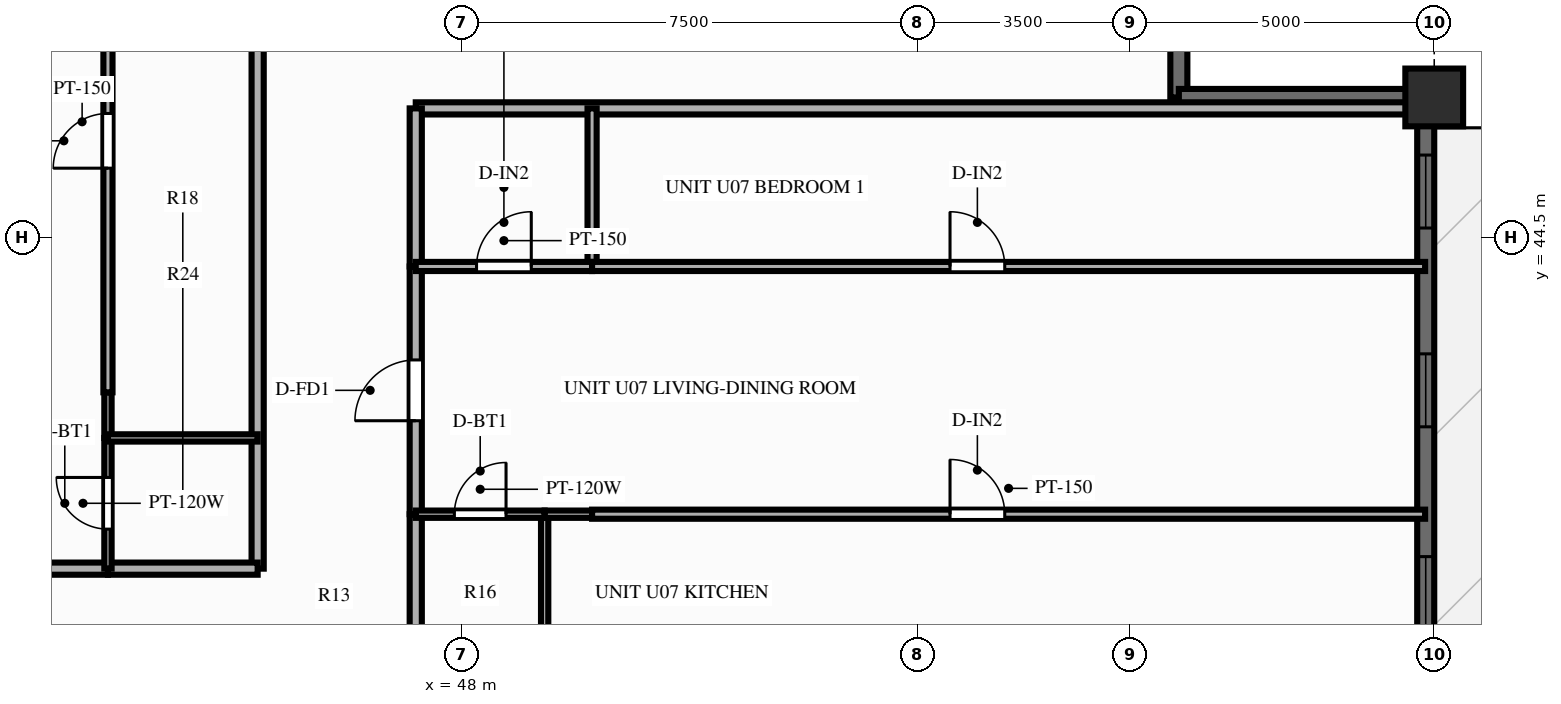
"""IFC4 building model, lengths in metres.
Left out: names, types, materials, properties, quantities, classifications, styles, units other than length and angle.
Written with IfcOpenShell. Run it as: python <this file> out.ifc"""

import sys

from ifc_helpers import new_model, si_unit, direction, frame, frame_2d, origin, origin_2d, place, context, subcontext, project, spatial, rectangle, extrude, source, transform, mapped, element, fill, save


model = new_model("IFC4")
c1 = context("Model", 3, precision=1e-05, world=origin(), true_north=direction((0.0, 1.0)))
c2 = subcontext(c1, "Body", "Model", "MODEL_VIEW")
j1 = project(units=[si_unit("LENGTHUNIT", "METRE"), si_unit("PLANEANGLEUNIT", "RADIAN")], contexts=[c1])
p1 = place(None, origin())
s1 = spatial("IfcSite", under=j1, at=p1, CompositionType="ELEMENT")
p2 = place(p1, origin())
s2 = spatial("IfcBuilding", under=s1, at=p2, CompositionType="ELEMENT")
p3 = place(p2, frame((0.0, 0.0, 95.85)))
s3 = spatial("IfcBuildingStorey", under=s2, at=p3, CompositionType="ELEMENT", Elevation=95.85)
m1 = source(origin(), c2, "Body", "SweptSolid", [
    extrude(rectangle(XDim=0.95, YDim=0.95, at=origin_2d()), origin(), (0.0, 0.0, 1.0), 3.0),
])
p4 = place(p3, frame((64.0, 46.8, 0.0), z_axis=(0.0, 0.0, 1.0), x_axis=(1.0, 0.0, 0.0)))
e1 = element("IfcColumn", 1, at=p4, inside=s3, PredefinedType="COLUMN", context=c2, shape_type="MappedRepresentation", body=[
    mapped(m1, transform((0.0, 0.0, 0.0), scale=1.0)),
])
p5 = place(p3, frame((63.86, 7.2, 0.0), z_axis=(0.0, 0.0, 1.0), x_axis=(0.0, 1.0, 0.0)))
e2 = element("IfcWall", 2, at=p5, inside=s3, PredefinedType="SOLIDWALL", context=c2, shape_type="SweptSolid", body=[
    extrude(rectangle(XDim=39.6, YDim=0.28, at=frame_2d((19.8, 0.0))), origin(), (0.0, 0.0, 1.0), 2.28),
])
p6 = place(p5, frame((0.945, 0.0, 0.25)))
e3 = element("IfcOpeningElement", 3, at=p6, cuts=e2, PredefinedType="OPENING", context=c2, shape_type="SweptSolid", body=[
    extrude(rectangle(XDim=1.2, YDim=1.5, at=frame_2d((0.6, 0.75))), frame((0.0, 0.152, 0.0), z_axis=(0.0, -1.0, 0.0), x_axis=(1.0, 0.0, 0.0)), (0.0, 0.0, 1.0), 0.304),
])
p7 = place(p5, frame((4.213, 0.0, 0.25)))
e4 = element("IfcOpeningElement", 4, at=p7, cuts=e2, PredefinedType="OPENING", context=c2, shape_type="SweptSolid", body=[
    extrude(rectangle(XDim=1.2, YDim=1.5, at=frame_2d((0.6, 0.75))), frame((0.0, 0.152, 0.0), z_axis=(0.0, -1.0, 0.0), x_axis=(1.0, 0.0, 0.0)), (0.0, 0.0, 1.0), 0.304),
])
p8 = place(p5, frame((7.55, 0.0, 0.25)))
e5 = element("IfcOpeningElement", 5, at=p8, cuts=e2, PredefinedType="OPENING", context=c2, shape_type="SweptSolid", body=[
    extrude(rectangle(XDim=1.2, YDim=1.5, at=frame_2d((0.6, 0.75))), frame((0.0, 0.152, 0.0), z_axis=(0.0, -1.0, 0.0), x_axis=(1.0, 0.0, 0.0)), (0.0, 0.0, 1.0), 0.304),
])
p9 = place(p5, frame((13.483, 0.0, 0.25)))
e6 = element("IfcOpeningElement", 6, at=p9, cuts=e2, PredefinedType="OPENING", context=c2, shape_type="SweptSolid", body=[
    extrude(rectangle(XDim=1.2, YDim=1.5, at=frame_2d((0.6, 0.75))), frame((0.0, 0.152, 0.0), z_axis=(0.0, -1.0, 0.0), x_axis=(1.0, 0.0, 0.0)), (0.0, 0.0, 1.0), 0.304),
])
p10 = place(p5, frame((16.82, 0.0, 0.25)))
e7 = element("IfcOpeningElement", 7, at=p10, cuts=e2, PredefinedType="OPENING", context=c2, shape_type="SweptSolid", body=[
    extrude(rectangle(XDim=1.2, YDim=1.5, at=frame_2d((0.6, 0.75))), frame((0.0, 0.152, 0.0), z_axis=(0.0, -1.0, 0.0), x_axis=(1.0, 0.0, 0.0)), (0.0, 0.0, 1.0), 0.304),
])
p11 = place(p5, frame((19.2, 0.0, 0.25)))
e8 = element("IfcOpeningElement", 8, at=p11, cuts=e2, PredefinedType="OPENING", context=c2, shape_type="SweptSolid", body=[
    extrude(rectangle(XDim=1.2, YDim=1.5, at=frame_2d((0.6, 0.75))), frame((0.0, 0.152, 0.0), z_axis=(0.0, -1.0, 0.0), x_axis=(1.0, 0.0, 0.0)), (0.0, 0.0, 1.0), 0.304),
])
p12 = place(p5, frame((21.578, 0.0, 0.25)))
e9 = element("IfcOpeningElement", 9, at=p12, cuts=e2, PredefinedType="OPENING", context=c2, shape_type="SweptSolid", body=[
    extrude(rectangle(XDim=1.2, YDim=1.5, at=frame_2d((0.6, 0.75))), frame((0.0, 0.152, 0.0), z_axis=(0.0, -1.0, 0.0), x_axis=(1.0, 0.0, 0.0)), (0.0, 0.0, 1.0), 0.304),
])
p13 = place(p5, frame((26.313, 0.0, 0.0), z_axis=(0.0, 0.0, 1.0), x_axis=(-1.0, 0.0, 0.0)))
e10 = element("IfcOpeningElement", 10, at=p13, cuts=e2, PredefinedType="OPENING", context=c2, shape_type="SweptSolid", body=[
    extrude(rectangle(XDim=1.6, YDim=2.15, at=frame_2d((0.8, 1.075))), frame((0.0, 0.152, 0.0), z_axis=(0.0, -1.0, 0.0), x_axis=(1.0, 0.0, 0.0)), (0.0, 0.0, 1.0), 0.304),
])
p14 = place(p5, frame((29.305, 0.0, 0.25)))
e11 = element("IfcOpeningElement", 11, at=p14, cuts=e2, PredefinedType="OPENING", context=c2, shape_type="SweptSolid", body=[
    extrude(rectangle(XDim=0.7, YDim=1.5, at=frame_2d((0.35, 0.75))), frame((0.0, 0.152, 0.0), z_axis=(0.0, -1.0, 0.0), x_axis=(1.0, 0.0, 0.0)), (0.0, 0.0, 1.0), 0.304),
])
p15 = place(p5, frame((30.848, 0.0, 0.25)))
e12 = element("IfcOpeningElement", 12, at=p15, cuts=e2, PredefinedType="OPENING", context=c2, shape_type="SweptSolid", body=[
    extrude(rectangle(XDim=1.2, YDim=1.5, at=frame_2d((0.6, 0.75))), frame((0.0, 0.152, 0.0), z_axis=(0.0, -1.0, 0.0), x_axis=(1.0, 0.0, 0.0)), (0.0, 0.0, 1.0), 0.304),
])
p16 = place(p5, frame((34.183, 0.0, 0.25)))
e13 = element("IfcOpeningElement", 13, at=p16, cuts=e2, PredefinedType="OPENING", context=c2, shape_type="SweptSolid", body=[
    extrude(rectangle(XDim=1.2, YDim=1.5, at=frame_2d((0.6, 0.75))), frame((0.0, 0.152, 0.0), z_axis=(0.0, -1.0, 0.0), x_axis=(1.0, 0.0, 0.0)), (0.0, 0.0, 1.0), 0.304),
])
p17 = place(p5, frame((37.452, 0.0, 0.25)))
e14 = element("IfcOpeningElement", 14, at=p17, cuts=e2, PredefinedType="OPENING", context=c2, shape_type="SweptSolid", body=[
    extrude(rectangle(XDim=1.2, YDim=1.5, at=frame_2d((0.6, 0.75))), frame((0.0, 0.152, 0.0), z_axis=(0.0, -1.0, 0.0), x_axis=(1.0, 0.0, 0.0)), (0.0, 0.0, 1.0), 0.304),
])
for number, where, z_axis, x_axis in (
    (15, (59.8, 46.8, 0.0), (0.0, 0.0, 1.0), (0.0, 1.0, 0.0)),
    (16, (59.8, 46.8, 0.0), (0.0, 0.0, 1.0), (1.0, 0.0, 0.0)),
):
    element("IfcWall", number, at=place(p3, frame(where, z_axis=z_axis, x_axis=x_axis)), inside=s3, PredefinedType="SOLIDWALL", context=c2, shape_type="SweptSolid", body=[
        extrude(rectangle(XDim=4.12, YDim=0.28, at=frame_2d((2.06, 0.0))), origin(), (0.0, 0.0, 1.0), 2.28),
    ])
p18 = place(p3, frame((44.65, 39.05, 0.0), z_axis=(0.0, 0.0, 1.0), x_axis=(0.0, 1.0, 0.0)))
e17 = element("IfcWall", 17, at=p18, inside=s3, PredefinedType="PARTITIONING", context=c2, shape_type="SweptSolid", body=[
    extrude(rectangle(XDim=11.8, YDim=0.2, at=frame_2d((5.9, 0.0))), origin(), (0.0, 0.0, 1.0), 2.34),
])
p19 = place(p3, frame((39.298, 39.05, 0.0), z_axis=(0.0, 0.0, 1.0), x_axis=(1.0, 0.0, 0.0)))
e18 = element("IfcWall", 18, at=p19, inside=s3, PredefinedType="PARTITIONING", context=c2, shape_type="SweptSolid", body=[
    extrude(rectangle(XDim=2.89, YDim=0.2, at=frame_2d((1.445, 0.0))), origin(), (0.0, 0.0, 1.0), 2.79),
])
p20 = place(p19, frame((0.945, 0.0, 0.0)))
e19 = element("IfcOpeningElement", 19, at=p20, cuts=e18, PredefinedType="OPENING", context=c2, shape_type="SweptSolid", body=[
    extrude(rectangle(XDim=1.0, YDim=2.15, at=frame_2d((0.5, 1.075))), frame((0.0, 0.112, 0.0), z_axis=(0.0, -1.0, 0.0), x_axis=(1.0, 0.0, 0.0)), (0.0, 0.0, 1.0), 0.224),
])
p21 = place(p3, frame((42.188, 39.05, 0.0), z_axis=(0.0, 0.0, 1.0), x_axis=(1.0, 0.0, 0.0)))
e20 = element("IfcWall", 20, at=p21, inside=s3, PredefinedType="PARTITIONING", context=c2, shape_type="SweptSolid", body=[
    extrude(rectangle(XDim=2.462, YDim=0.2, at=frame_2d((1.231, 0.0))), origin(), (0.0, 0.0, 1.0), 2.79),
])
p22 = place(p3, frame((42.188, 39.05, 0.0), z_axis=(0.0, 0.0, 1.0), x_axis=(0.0, 1.0, 0.0)))
e21 = element("IfcWall", 21, at=p22, inside=s3, PredefinedType="PARTITIONING", context=c2, shape_type="SweptSolid", body=[
    extrude(rectangle(XDim=2.15, YDim=0.12, at=frame_2d((1.075, 0.0))), origin(), (0.0, 0.0, 1.0), 2.79),
])
p23 = place(p22, frame((0.65, 0.0, 0.0)))
e22 = element("IfcOpeningElement", 22, at=p23, cuts=e21, PredefinedType="OPENING", context=c2, shape_type="SweptSolid", body=[
    extrude(rectangle(XDim=0.85, YDim=2.05, at=frame_2d((0.425, 1.025))), frame((0.0, 0.072, 0.0), z_axis=(0.0, -1.0, 0.0), x_axis=(1.0, 0.0, 0.0)), (0.0, 0.0, 1.0), 0.144),
])
p24 = place(p3, frame((42.188, 41.2, 0.0), z_axis=(0.0, 0.0, 1.0), x_axis=(0.0, 1.0, 0.0)))
e23 = element("IfcWall", 23, at=p24, inside=s3, PredefinedType="PARTITIONING", context=c2, shape_type="SweptSolid", body=[
    extrude(rectangle(XDim=0.75, YDim=0.12, at=frame_2d((0.375, 0.0))), origin(), (0.0, 0.0, 1.0), 2.79),
])
p25 = place(p3, frame((42.188, 41.2, 0.0), z_axis=(0.0, 0.0, 1.0), x_axis=(1.0, 0.0, 0.0)))
e24 = element("IfcWall", 24, at=p25, inside=s3, PredefinedType="PARTITIONING", context=c2, shape_type="SweptSolid", body=[
    extrude(rectangle(XDim=2.462, YDim=0.12, at=frame_2d((1.231, 0.0))), origin(), (0.0, 0.0, 1.0), 2.79),
])
p26 = place(p3, frame((42.188, 41.95, 0.0), z_axis=(0.0, 0.0, 1.0), x_axis=(0.0, 1.0, 0.0)))
e25 = element("IfcWall", 25, at=p26, inside=s3, PredefinedType="PARTITIONING", context=c2, shape_type="SweptSolid", body=[
    extrude(rectangle(XDim=8.9, YDim=0.15, at=frame_2d((4.45, 0.0))), origin(), (0.0, 0.0, 1.0), 2.79),
])
p27 = place(p26, frame((3.687, 0.0, 0.0)))
e26 = element("IfcOpeningElement", 26, at=p27, cuts=e25, PredefinedType="OPENING", context=c2, shape_type="SweptSolid", body=[
    extrude(rectangle(XDim=0.9, YDim=2.1, at=frame_2d((0.45, 1.05))), frame((0.0, 0.087, 0.0), z_axis=(0.0, -1.0, 0.0), x_axis=(1.0, 0.0, 0.0)), (0.0, 0.0, 1.0), 0.174),
])
p28 = place(p3, frame((47.25, 46.62, 0.0), z_axis=(0.0, 0.0, 1.0), x_axis=(1.0, 0.0, 0.0)))
e27 = element("IfcWall", 27, at=p28, inside=s3, PredefinedType="PARTITIONING", context=c2, shape_type="SweptSolid", body=[
    extrude(rectangle(XDim=16.6, YDim=0.2, at=frame_2d((8.3, 0.0))), origin(), (0.0, 0.0, 1.0), 2.79),
])
p29 = place(p3, frame((47.25, 37.35, 0.0), z_axis=(0.0, 0.0, 1.0), x_axis=(0.0, 1.0, 0.0)))
e28 = element("IfcWall", 28, at=p29, inside=s3, PredefinedType="PARTITIONING", context=c2, shape_type="SweptSolid", body=[
    extrude(rectangle(XDim=2.595, YDim=0.2, at=frame_2d((1.298, 0.0))), origin(), (0.0, 0.0, 1.0), 2.79),
])
p30 = place(p3, frame((47.25, 39.946, 0.0), z_axis=(0.0, 0.0, 1.0), x_axis=(0.0, 1.0, 0.0)))
e29 = element("IfcWall", 29, at=p30, inside=s3, PredefinedType="PARTITIONING", context=c2, shape_type="SweptSolid", body=[
    extrude(rectangle(XDim=4.074, YDim=0.2, at=frame_2d((2.037, 0.0))), origin(), (0.0, 0.0, 1.0), 2.79),
])
p31 = place(p30, frame((1.537, 0.0, 0.0)))
e30 = element("IfcOpeningElement", 30, at=p31, cuts=e29, PredefinedType="OPENING", context=c2, shape_type="SweptSolid", body=[
    extrude(rectangle(XDim=1.0, YDim=2.15, at=frame_2d((0.5, 1.075))), frame((0.0, 0.112, 0.0), z_axis=(0.0, -1.0, 0.0), x_axis=(1.0, 0.0, 0.0)), (0.0, 0.0, 1.0), 0.224),
])
p32 = place(p3, frame((47.25, 44.02, 0.0), z_axis=(0.0, 0.0, 1.0), x_axis=(0.0, 1.0, 0.0)))
e31 = element("IfcWall", 31, at=p32, inside=s3, PredefinedType="PARTITIONING", context=c2, shape_type="SweptSolid", body=[
    extrude(rectangle(XDim=2.6, YDim=0.2, at=frame_2d((1.3, 0.0))), origin(), (0.0, 0.0, 1.0), 2.79),
])
p33 = place(p3, frame((49.37, 37.35, 0.0), z_axis=(0.0, 0.0, 1.0), x_axis=(0.0, 1.0, 0.0)))
e32 = element("IfcWall", 32, at=p33, inside=s3, PredefinedType="PARTITIONING", context=c2, shape_type="SweptSolid", body=[
    extrude(rectangle(XDim=2.595, YDim=0.12, at=frame_2d((1.298, 0.0))), origin(), (0.0, 0.0, 1.0), 2.79),
])
p34 = place(p3, frame((50.15, 44.02, 0.0), z_axis=(0.0, 0.0, 1.0), x_axis=(0.0, 1.0, 0.0)))
e33 = element("IfcWall", 33, at=p34, inside=s3, PredefinedType="PARTITIONING", context=c2, shape_type="SweptSolid", body=[
    extrude(rectangle(XDim=2.6, YDim=0.15, at=frame_2d((1.3, 0.0))), origin(), (0.0, 0.0, 1.0), 2.79),
])
p35 = place(p3, frame((47.25, 39.946, 0.0), z_axis=(0.0, 0.0, 1.0), x_axis=(1.0, 0.0, 0.0)))
e34 = element("IfcWall", 34, at=p35, inside=s3, PredefinedType="PARTITIONING", context=c2, shape_type="SweptSolid", body=[
    extrude(rectangle(XDim=2.12, YDim=0.12, at=frame_2d((1.06, 0.0))), origin(), (0.0, 0.0, 1.0), 2.79),
])
p36 = place(p35, frame((0.635, 0.0, 0.0)))
e35 = element("IfcOpeningElement", 35, at=p36, cuts=e34, PredefinedType="OPENING", context=c2, shape_type="SweptSolid", body=[
    extrude(rectangle(XDim=0.85, YDim=2.05, at=frame_2d((0.425, 1.025))), frame((0.0, 0.072, 0.0), z_axis=(0.0, -1.0, 0.0), x_axis=(1.0, 0.0, 0.0)), (0.0, 0.0, 1.0), 0.144),
])
p37 = place(p3, frame((49.37, 39.946, 0.0), z_axis=(0.0, 0.0, 1.0), x_axis=(1.0, 0.0, 0.0)))
e36 = element("IfcWall", 36, at=p37, inside=s3, PredefinedType="PARTITIONING", context=c2, shape_type="SweptSolid", body=[
    extrude(rectangle(XDim=0.78, YDim=0.12, at=frame_2d((0.39, 0.0))), origin(), (0.0, 0.0, 1.0), 2.79),
])
p38 = place(p3, frame((50.15, 39.946, 0.0), z_axis=(0.0, 0.0, 1.0), x_axis=(1.0, 0.0, 0.0)))
e37 = element("IfcWall", 37, at=p38, inside=s3, PredefinedType="PARTITIONING", context=c2, shape_type="SweptSolid", body=[
    extrude(rectangle(XDim=13.7, YDim=0.15, at=frame_2d((6.85, 0.0))), origin(), (0.0, 0.0, 1.0), 2.79),
])
p39 = place(p38, frame((5.887, 0.0, 0.0)))
e38 = element("IfcOpeningElement", 38, at=p39, cuts=e37, PredefinedType="OPENING", context=c2, shape_type="SweptSolid", body=[
    extrude(rectangle(XDim=0.9, YDim=2.1, at=frame_2d((0.45, 1.05))), frame((0.0, 0.087, 0.0), z_axis=(0.0, -1.0, 0.0), x_axis=(1.0, 0.0, 0.0)), (0.0, 0.0, 1.0), 0.174),
])
p40 = place(p3, frame((47.25, 44.02, 0.0), z_axis=(0.0, 0.0, 1.0), x_axis=(1.0, 0.0, 0.0)))
e39 = element("IfcWall", 39, at=p40, inside=s3, PredefinedType="PARTITIONING", context=c2, shape_type="SweptSolid", body=[
    extrude(rectangle(XDim=2.9, YDim=0.15, at=frame_2d((1.45, 0.0))), origin(), (0.0, 0.0, 1.0), 2.79),
])
p41 = place(p40, frame((1.0, 0.0, 0.0)))
e40 = element("IfcOpeningElement", 40, at=p41, cuts=e39, PredefinedType="OPENING", context=c2, shape_type="SweptSolid", body=[
    extrude(rectangle(XDim=0.9, YDim=2.1, at=frame_2d((0.45, 1.05))), frame((0.0, 0.087, 0.0), z_axis=(0.0, -1.0, 0.0), x_axis=(1.0, 0.0, 0.0)), (0.0, 0.0, 1.0), 0.174),
])
p42 = place(p3, frame((50.15, 44.02, 0.0), z_axis=(0.0, 0.0, 1.0), x_axis=(1.0, 0.0, 0.0)))
e41 = element("IfcWall", 41, at=p42, inside=s3, PredefinedType="PARTITIONING", context=c2, shape_type="SweptSolid", body=[
    extrude(rectangle(XDim=13.7, YDim=0.15, at=frame_2d((6.85, 0.0))), origin(), (0.0, 0.0, 1.0), 2.79),
])
p43 = place(p42, frame((5.887, 0.0, 0.0)))
e42 = element("IfcOpeningElement", 42, at=p43, cuts=e41, PredefinedType="OPENING", context=c2, shape_type="SweptSolid", body=[
    extrude(rectangle(XDim=0.9, YDim=2.1, at=frame_2d((0.45, 1.05))), frame((0.0, 0.087, 0.0), z_axis=(0.0, -1.0, 0.0), x_axis=(1.0, 0.0, 0.0)), (0.0, 0.0, 1.0), 0.174),
])
m2 = source(origin(), c2, "Body", "SweptSolid", [
    extrude(rectangle(XDim=1.2, YDim=1.5, at=frame_2d((0.6, 0.75))), frame((0.0, 0.03, 0.0), z_axis=(0.0, -1.0, 0.0), x_axis=(1.0, 0.0, 0.0)), (0.0, 0.0, 1.0), 0.06),
])
p44 = place(p15, origin())
e43 = element("IfcWindow", 43, at=p44, inside=s3, PartitioningType="SINGLE_PANEL", PredefinedType="WINDOW", context=c2, shape_type="MappedRepresentation", body=[
    mapped(m2, transform((0.0, 0.0, 0.0), scale=1.0)),
])
fill(e12, e43)
p45 = place(p16, origin())
e44 = element("IfcWindow", 44, at=p45, inside=s3, PartitioningType="SINGLE_PANEL", PredefinedType="WINDOW", context=c2, shape_type="MappedRepresentation", body=[
    mapped(m2, transform((0.0, 0.0, 0.0), scale=1.0)),
])
fill(e13, e44)
p46 = place(p17, origin())
e45 = element("IfcWindow", 45, at=p46, inside=s3, PartitioningType="SINGLE_PANEL", PredefinedType="WINDOW", context=c2, shape_type="MappedRepresentation", body=[
    mapped(m2, transform((0.0, 0.0, 0.0), scale=1.0)),
])
fill(e14, e45)
m3 = source(origin(), c2, "Body", "SweptSolid", [
    extrude(rectangle(XDim=0.85, YDim=2.05, at=frame_2d((0.425, 1.025))), frame((0.0, 0.025, 0.0), z_axis=(0.0, -1.0, 0.0), x_axis=(1.0, 0.0, 0.0)), (0.0, 0.0, 1.0), 0.05),
])
p47 = place(p23, origin())
e46 = element("IfcDoor", 46, at=p47, inside=s3, OperationType="SINGLE_SWING_RIGHT", PredefinedType="DOOR", context=c2, shape_type="MappedRepresentation", body=[
    mapped(m3, transform((0.0, 0.0, 0.0), scale=1.0)),
])
fill(e22, e46)
m4 = source(origin(), c2, "Body", "SweptSolid", [
    extrude(rectangle(XDim=0.9, YDim=2.1, at=frame_2d((0.45, 1.05))), frame((0.0, 0.025, 0.0), z_axis=(0.0, -1.0, 0.0), x_axis=(1.0, 0.0, 0.0)), (0.0, 0.0, 1.0), 0.05),
])
p48 = place(p27, origin())
e47 = element("IfcDoor", 47, at=p48, inside=s3, OperationType="SINGLE_SWING_LEFT", PredefinedType="DOOR", context=c2, shape_type="MappedRepresentation", body=[
    mapped(m4, transform((0.0, 0.0, 0.0), scale=1.0)),
])
fill(e26, e47)
m5 = source(origin(), c2, "Body", "SweptSolid", [
    extrude(rectangle(XDim=1.0, YDim=2.15, at=frame_2d((0.5, 1.075))), frame((0.0, 0.025, 0.0), z_axis=(0.0, -1.0, 0.0), x_axis=(1.0, 0.0, 0.0)), (0.0, 0.0, 1.0), 0.05),
])
p49 = place(p31, origin())
e48 = element("IfcDoor", 48, at=p49, inside=s3, OperationType="SINGLE_SWING_LEFT", PredefinedType="DOOR", context=c2, shape_type="MappedRepresentation", body=[
    mapped(m5, transform((0.0, 0.0, 0.0), scale=1.0)),
])
fill(e30, e48)
p50 = place(p36, origin())
e49 = element("IfcDoor", 49, at=p50, inside=s3, OperationType="SINGLE_SWING_RIGHT", PredefinedType="DOOR", context=c2, shape_type="MappedRepresentation", body=[
    mapped(m3, transform((0.0, 0.0, 0.0), scale=1.0)),
])
fill(e35, e49)
p51 = place(p39, origin())
e50 = element("IfcDoor", 50, at=p51, inside=s3, OperationType="SINGLE_SWING_LEFT", PredefinedType="DOOR", context=c2, shape_type="MappedRepresentation", body=[
    mapped(m4, transform((0.0, 0.0, 0.0), scale=1.0)),
])
fill(e38, e50)
p52 = place(p41, origin())
e51 = element("IfcDoor", 51, at=p52, inside=s3, OperationType="SINGLE_SWING_RIGHT", PredefinedType="DOOR", context=c2, shape_type="MappedRepresentation", body=[
    mapped(m4, transform((0.0, 0.0, 0.0), scale=1.0)),
])
fill(e40, e51)
p53 = place(p43, origin())
e52 = element("IfcDoor", 52, at=p53, inside=s3, OperationType="SINGLE_SWING_LEFT", PredefinedType="DOOR", context=c2, shape_type="MappedRepresentation", body=[
    mapped(m4, transform((0.0, 0.0, 0.0), scale=1.0)),
])
fill(e42, e52)
save(model, sys.argv[1])
